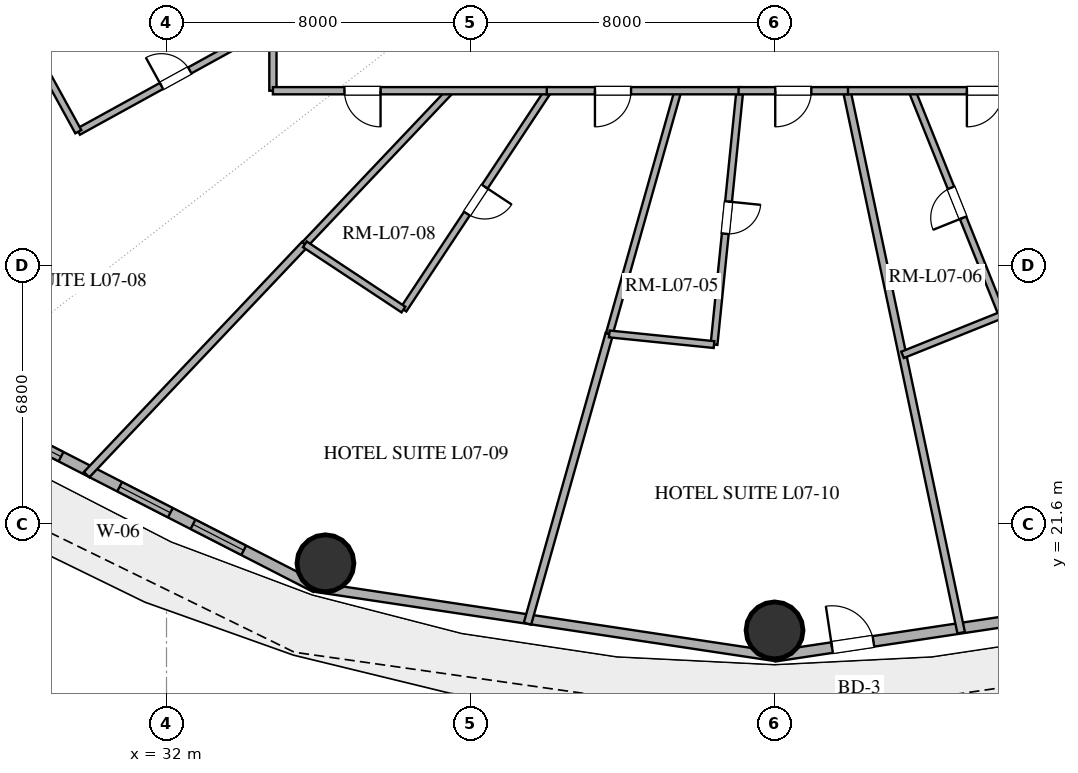
"""IFC4 building model, lengths in metres.
Left out: names, types, materials, properties, quantities, classifications, styles, units other than length and angle.
Written with IfcOpenShell. Run it as: python <this file> out.ifc"""

import sys

from ifc_helpers import new_model, si_unit, direction, frame, frame_2d, origin, origin_2d, place, context, subcontext, project, spatial, rectangle, hollow_circle, extrude, element, fill, save


model = new_model("IFC4")
c1 = context("Model", 3, precision=1e-05, world=origin(), true_north=direction((0.0, 1.0)))
c2 = subcontext(c1, "Body", "Model", "MODEL_VIEW")
j1 = project(units=[si_unit("LENGTHUNIT", "METRE"), si_unit("PLANEANGLEUNIT", "RADIAN")], contexts=[c1])
p1 = place(None, origin())
s1 = spatial("IfcSite", under=j1, at=p1, CompositionType="ELEMENT")
p2 = place(p1, origin())
s2 = spatial("IfcBuilding", under=s1, at=p2, CompositionType="ELEMENT")
p3 = place(p2, frame((0.0, 0.0, 35.4)))
s3 = spatial("IfcBuildingStorey", under=s2, at=p3, CompositionType="ELEMENT", Elevation=35.4)
for number, where, z_axis, x_axis in (
    (1, (36.182, 20.566, 0.0), (0.0, 0.0, 1.0), (1.0, 0.0, 0.0)),
    (2, (48.0, 18.8, 0.0), (0.0, 0.0, 1.0), (1.0, 0.0, 0.0)),
):
    element("IfcColumn", number, at=place(p3, frame(where, z_axis=z_axis, x_axis=x_axis)), inside=s3, PredefinedType="COLUMN", context=c2, shape_type="SweptSolid", body=[
        extrude(hollow_circle(Radius=0.75, WallThickness=0.04, at=origin_2d()), origin(), (0.0, 0.0, 1.0), 3.38),
    ])
p4 = place(p3, frame((25.826, 25.114, 0.0), z_axis=(0.0, 0.0, 1.0), x_axis=(0.889853976658, -0.456245438581, 0.0)))
e3 = element("IfcWall", 3, at=p4, inside=s3, PredefinedType="SOLIDWALL", context=c2, shape_type="SweptSolid", body=[
    extrude(rectangle(XDim=11.346, YDim=0.28, at=frame_2d((5.673, 0.0))), origin(), (0.0, 0.0, 1.0), 3.38),
])
p5 = place(p4, frame((2.17, 0.0, 0.85)))
e4 = element("IfcOpeningElement", 4, at=p5, cuts=e3, PredefinedType="OPENING", context=c2, shape_type="SweptSolid", body=[
    extrude(rectangle(XDim=1.65, YDim=2.0, at=frame_2d((0.825, 1.0))), frame((0.0, 0.15, 0.0), z_axis=(0.0, -1.0, 0.0), x_axis=(1.0, 0.0, 0.0)), (0.0, 0.0, 1.0), 0.3),
])
p6 = place(p4, frame((5.553, 0.0, 0.85)))
e5 = element("IfcOpeningElement", 5, at=p6, cuts=e3, PredefinedType="OPENING", context=c2, shape_type="SweptSolid", body=[
    extrude(rectangle(XDim=1.5, YDim=2.0, at=frame_2d((0.75, 1.0))), frame((0.0, 0.15, 0.0), z_axis=(0.0, -1.0, 0.0), x_axis=(1.0, 0.0, 0.0)), (0.0, 0.0, 1.0), 0.3),
])
p7 = place(p4, frame((7.722, 0.0, 0.85)))
e6 = element("IfcOpeningElement", 6, at=p7, cuts=e3, PredefinedType="OPENING", context=c2, shape_type="SweptSolid", body=[
    extrude(rectangle(XDim=1.5, YDim=2.0, at=frame_2d((0.75, 1.0))), frame((0.0, 0.15, 0.0), z_axis=(0.0, -1.0, 0.0), x_axis=(1.0, 0.0, 0.0)), (0.0, 0.0, 1.0), 0.3),
])
p8 = place(p3, frame((35.922, 19.938, 0.0), z_axis=(0.0, 0.0, 1.0), x_axis=(0.988864835849, -0.148816452121, 0.0)))
e7 = element("IfcWall", 7, at=p8, inside=s3, PredefinedType="SOLIDWALL", context=c2, shape_type="SweptSolid", body=[
    extrude(rectangle(XDim=12.214, YDim=0.25, at=frame_2d((6.107, 0.0))), origin(), (0.0, 0.0, 1.0), 3.38),
])
p9 = place(p3, frame((48.0, 18.12, 0.0), z_axis=(0.0, 0.0, 1.0), x_axis=(0.988864835849, 0.148816452121, 0.0)))
e8 = element("IfcWall", 8, at=p9, inside=s3, PredefinedType="SOLIDWALL", context=c2, shape_type="SweptSolid", body=[
    extrude(rectangle(XDim=12.214, YDim=0.28, at=frame_2d((6.107, 0.0))), origin(), (0.0, 0.0, 1.0), 3.38),
])
p10 = place(p9, frame((1.531, 0.0, 0.0)))
e9 = element("IfcOpeningElement", 9, at=p10, cuts=e8, PredefinedType="OPENING", context=c2, shape_type="SweptSolid", body=[
    extrude(rectangle(XDim=1.1, YDim=2.25, at=frame_2d((0.55, 1.125))), frame((0.0, 0.15, 0.0), z_axis=(0.0, -1.0, 0.0), x_axis=(1.0, 0.0, 0.0)), (0.0, 0.0, 1.0), 0.3),
])
p11 = place(p9, frame((6.116, 0.0, 0.85)))
e10 = element("IfcOpeningElement", 10, at=p11, cuts=e8, PredefinedType="OPENING", context=c2, shape_type="SweptSolid", body=[
    extrude(rectangle(XDim=1.35, YDim=1.8, at=frame_2d((0.675, 0.9))), frame((0.0, 0.15, 0.0), z_axis=(0.0, -1.0, 0.0), x_axis=(1.0, 0.0, 0.0)), (0.0, 0.0, 1.0), 0.3),
])
p12 = place(p9, frame((8.383, 0.0, 0.85)))
e11 = element("IfcOpeningElement", 11, at=p12, cuts=e8, PredefinedType="OPENING", context=c2, shape_type="SweptSolid", body=[
    extrude(rectangle(XDim=1.35, YDim=1.8, at=frame_2d((0.675, 0.9))), frame((0.0, 0.15, 0.0), z_axis=(0.0, -1.0, 0.0), x_axis=(1.0, 0.0, 0.0)), (0.0, 0.0, 1.0), 0.3),
])
p13 = place(p3, frame((34.8, 37.494, 0.0), z_axis=(0.0, 0.0, 1.0), x_axis=(-0.946390715793, -0.32302416792, 0.0)))
e12 = element("IfcWall", 12, at=p13, inside=s3, PredefinedType="PARTITIONING", context=c2, shape_type="SweptSolid", body=[
    extrude(rectangle(XDim=15.952, YDim=0.2, at=frame_2d((7.976, 0.0))), origin(), (0.0, 0.0, 1.0), 2.74),
])
p14 = place(p3, frame((29.897, 22.898, 0.0), z_axis=(0.0, 0.0, 1.0), x_axis=(0.687860615602, 0.725842802198, 0.0)))
e13 = element("IfcWall", 13, at=p14, inside=s3, PredefinedType="PARTITIONING", context=c2, shape_type="SweptSolid", body=[
    extrude(rectangle(XDim=8.35, YDim=0.2, at=frame_2d((4.175, 0.0))), origin(), (0.0, 0.0, 1.0), 2.74),
])
p15 = place(p3, frame((41.499, 18.978, 0.0), z_axis=(0.0, 0.0, 1.0), x_axis=(0.271768364569, 0.962362694632, 0.0)))
e14 = element("IfcWall", 14, at=p15, inside=s3, PredefinedType="PARTITIONING", context=c2, shape_type="SweptSolid", body=[
    extrude(rectangle(XDim=7.921, YDim=0.2, at=frame_2d((3.96, 0.0))), origin(), (0.0, 0.0, 1.0), 2.74),
])
p16 = place(p3, frame((49.9, 33.0, 0.0), z_axis=(0.0, 0.0, 1.0), x_axis=(0.206598790959, -0.97842574556, 0.0)))
e15 = element("IfcWall", 15, at=p16, inside=s3, PredefinedType="PARTITIONING", context=c2, shape_type="SweptSolid", body=[
    extrude(rectangle(XDim=14.576, YDim=0.2, at=frame_2d((7.288, 0.0))), origin(), (0.0, 0.0, 1.0), 2.74),
])
p17 = place(p3, frame((42.045, 33.0, 0.0), z_axis=(0.0, 0.0, 1.0), x_axis=(-0.551832909025, -0.833954699319, 0.0)))
e16 = element("IfcWall", 16, at=p17, inside=s3, PredefinedType="PLUMBINGWALL", context=c2, shape_type="SweptSolid", body=[
    extrude(rectangle(XDim=6.905, YDim=0.18, at=frame_2d((3.452, 0.0))), origin(), (0.0, 0.0, 1.0), 2.74),
])
p18 = place(p17, frame((3.027, 0.0, 0.0)))
e17 = element("IfcOpeningElement", 17, at=p18, cuts=e16, PredefinedType="OPENING", context=c2, shape_type="SweptSolid", body=[
    extrude(rectangle(XDim=0.85, YDim=2.1, at=frame_2d((0.425, 1.05))), frame((0.0, 0.1, 0.0), z_axis=(0.0, -1.0, 0.0), x_axis=(1.0, 0.0, 0.0)), (0.0, 0.0, 1.0), 0.2),
])
p19 = place(p3, frame((47.086, 33.0, 0.0), z_axis=(0.0, 0.0, 1.0), x_axis=(-0.101019373019, -0.994884458756, 0.0)))
e18 = element("IfcWall", 18, at=p19, inside=s3, PredefinedType="PLUMBINGWALL", context=c2, shape_type="SweptSolid", body=[
    extrude(rectangle(XDim=6.714, YDim=0.18, at=frame_2d((3.357, 0.0))), origin(), (0.0, 0.0, 1.0), 2.74),
])
p20 = place(p19, frame((2.932, 0.0, 0.0)))
e19 = element("IfcOpeningElement", 19, at=p20, cuts=e18, PredefinedType="OPENING", context=c2, shape_type="SweptSolid", body=[
    extrude(rectangle(XDim=0.85, YDim=2.1, at=frame_2d((0.425, 1.05))), frame((0.0, 0.1, 0.0), z_axis=(0.0, -1.0, 0.0), x_axis=(1.0, 0.0, 0.0)), (0.0, 0.0, 1.0), 0.2),
])
p21 = place(p3, frame((43.651, 26.601, 0.0), z_axis=(0.0, 0.0, 1.0), x_axis=(0.271761873698, 0.962364527611, 0.0)))
e20 = element("IfcWall", 20, at=p21, inside=s3, PredefinedType="PLUMBINGWALL", context=c2, shape_type="SweptSolid", body=[
    extrude(rectangle(XDim=6.65, YDim=0.18, at=frame_2d((3.325, 0.0))), origin(), (0.0, 0.0, 1.0), 2.74),
])
p22 = place(p3, frame((34.8, 33.0, 0.0), z_axis=(0.0, 0.0, 1.0), x_axis=(0.0, 1.0, 0.0)))
e21 = element("IfcWall", 21, at=p22, inside=s3, PredefinedType="PARTITIONING", context=c2, shape_type="SweptSolid", body=[
    extrude(rectangle(XDim=18.0, YDim=0.19, at=frame_2d((9.0, 0.0))), origin(), (0.0, 0.0, 1.0), 2.74),
])
p23 = place(p22, frame((7.274, 0.0, 0.0)))
e22 = element("IfcOpeningElement", 22, at=p23, cuts=e21, PredefinedType="OPENING", context=c2, shape_type="SweptSolid", body=[
    extrude(rectangle(XDim=1.0, YDim=2.2, at=frame_2d((0.5, 1.1))), frame((0.0, 0.105, 0.0), z_axis=(0.0, -1.0, 0.0), x_axis=(1.0, 0.0, 0.0)), (0.0, 0.0, 1.0), 0.21),
])
p24 = place(p22, frame((12.854, 0.0, 0.0)))
e23 = element("IfcOpeningElement", 23, at=p24, cuts=e21, PredefinedType="OPENING", context=c2, shape_type="SweptSolid", body=[
    extrude(rectangle(XDim=0.95, YDim=2.15, at=frame_2d((0.475, 1.075))), frame((0.0, 0.105, 0.0), z_axis=(0.0, -1.0, 0.0), x_axis=(1.0, 0.0, 0.0)), (0.0, 0.0, 1.0), 0.21),
])
p25 = place(p3, frame((53.987, 27.102, 0.0), z_axis=(0.0, 0.0, 1.0), x_axis=(-0.37285379951, 0.927890103509, 0.0)))
e24 = element("IfcWall", 24, at=p25, inside=s3, PredefinedType="PLUMBINGWALL", context=c2, shape_type="SweptSolid", body=[
    extrude(rectangle(XDim=6.356, YDim=0.18, at=frame_2d((3.178, 0.0))), origin(), (0.0, 0.0, 1.0), 2.74),
])
p26 = place(p25, frame((2.753, 0.0, 0.0)))
e25 = element("IfcOpeningElement", 25, at=p26, cuts=e24, PredefinedType="OPENING", context=c2, shape_type="SweptSolid", body=[
    extrude(rectangle(XDim=0.85, YDim=2.1, at=frame_2d((0.425, 1.05))), frame((0.0, 0.1, 0.0), z_axis=(0.0, -1.0, 0.0), x_axis=(1.0, 0.0, 0.0)), (0.0, 0.0, 1.0), 0.2),
])
p27 = place(p3, frame((29.679, 31.922, 0.0), z_axis=(0.0, 0.0, 1.0), x_axis=(0.876185038284, 0.481974873503, 0.0)))
e26 = element("IfcWall", 26, at=p27, inside=s3, PredefinedType="PLUMBINGWALL", context=c2, shape_type="SweptSolid", body=[
    extrude(rectangle(XDim=5.844, YDim=0.18, at=frame_2d((2.922, 0.0))), origin(), (0.0, 0.0, 1.0), 2.74),
])
p28 = place(p27, frame((2.497, 0.0, 0.0)))
e27 = element("IfcOpeningElement", 27, at=p28, cuts=e26, PredefinedType="OPENING", context=c2, shape_type="SweptSolid", body=[
    extrude(rectangle(XDim=0.85, YDim=2.1, at=frame_2d((0.425, 1.05))), frame((0.0, 0.1, 0.0), z_axis=(0.0, -1.0, 0.0), x_axis=(1.0, 0.0, 0.0)), (0.0, 0.0, 1.0), 0.2),
])
p29 = place(p3, frame((35.64, 28.958, 0.0), z_axis=(0.0, 0.0, 1.0), x_axis=(0.687867465085, 0.725836311077, 0.0)))
e28 = element("IfcWall", 28, at=p29, inside=s3, PredefinedType="PLUMBINGWALL", context=c2, shape_type="SweptSolid", body=[
    extrude(rectangle(XDim=5.568, YDim=0.18, at=frame_2d((2.784, 0.0))), origin(), (0.0, 0.0, 1.0), 2.74),
])
p30 = place(p3, frame((42.083, 33.0, 0.0), z_axis=(0.0, 0.0, 1.0), x_axis=(-1.0, 0.0, 0.0)))
e29 = element("IfcWall", 29, at=p30, inside=s3, PredefinedType="PARTITIONING", context=c2, shape_type="SweptSolid", body=[
    extrude(rectangle(XDim=7.283, YDim=0.19, at=frame_2d((3.642, 0.0))), origin(), (0.0, 0.0, 1.0), 2.74),
])
p31 = place(p30, frame((4.451, 0.0, 0.0)))
e30 = element("IfcOpeningElement", 30, at=p31, cuts=e29, PredefinedType="OPENING", context=c2, shape_type="SweptSolid", body=[
    extrude(rectangle(XDim=0.95, YDim=2.15, at=frame_2d((0.475, 1.075))), frame((0.0, 0.105, 0.0), z_axis=(0.0, -1.0, 0.0), x_axis=(1.0, 0.0, 0.0)), (0.0, 0.0, 1.0), 0.21),
])
p32 = place(p3, frame((61.2, 33.0, 0.0), z_axis=(0.0, 0.0, 1.0), x_axis=(-1.0, 0.0, 0.0)))
e31 = element("IfcWall", 31, at=p32, inside=s3, PredefinedType="PARTITIONING", context=c2, shape_type="SweptSolid", body=[
    extrude(rectangle(XDim=11.3, YDim=0.19, at=frame_2d((5.65, 0.0))), origin(), (0.0, 0.0, 1.0), 2.74),
])
p33 = place(p32, frame((7.188, 0.0, 0.0)))
e32 = element("IfcOpeningElement", 32, at=p33, cuts=e31, PredefinedType="OPENING", context=c2, shape_type="SweptSolid", body=[
    extrude(rectangle(XDim=0.95, YDim=2.15, at=frame_2d((0.475, 1.075))), frame((0.0, 0.105, 0.0), z_axis=(0.0, -1.0, 0.0), x_axis=(1.0, 0.0, 0.0)), (0.0, 0.0, 1.0), 0.21),
])
p34 = place(p3, frame((27.908, 35.142, 0.0), z_axis=(0.0, 0.0, 1.0), x_axis=(0.481967195945, -0.876189261537, 0.0)))
e33 = element("IfcWall", 33, at=p34, inside=s3, PredefinedType="PLUMBINGWALL", context=c2, shape_type="SweptSolid", body=[
    extrude(rectangle(XDim=3.676, YDim=0.18, at=frame_2d((1.838, 0.0))), origin(), (0.0, 0.0, 1.0), 2.74),
])
p35 = place(p3, frame((47.118, 33.0, 0.0), z_axis=(0.0, 0.0, 1.0), x_axis=(-1.0, 0.0, 0.0)))
e34 = element("IfcWall", 34, at=p35, inside=s3, PredefinedType="PARTITIONING", context=c2, shape_type="SweptSolid", body=[
    extrude(rectangle(XDim=5.112, YDim=0.19, at=frame_2d((2.556, 0.0))), origin(), (0.0, 0.0, 1.0), 2.74),
])
p36 = place(p35, frame((2.894, 0.0, 0.0)))
e35 = element("IfcOpeningElement", 35, at=p36, cuts=e34, PredefinedType="OPENING", context=c2, shape_type="SweptSolid", body=[
    extrude(rectangle(XDim=0.95, YDim=2.15, at=frame_2d((0.475, 1.075))), frame((0.0, 0.105, 0.0), z_axis=(0.0, -1.0, 0.0), x_axis=(1.0, 0.0, 0.0)), (0.0, 0.0, 1.0), 0.21),
])
p37 = place(p3, frame((38.235, 27.242, 0.0), z_axis=(0.0, 0.0, 1.0), x_axis=(-0.833965136837, 0.551817135055, 0.0)))
e36 = element("IfcWall", 36, at=p37, inside=s3, PredefinedType="PLUMBINGWALL", context=c2, shape_type="SweptSolid", body=[
    extrude(rectangle(XDim=3.111, YDim=0.18, at=frame_2d((1.555, 0.0))), origin(), (0.0, 0.0, 1.0), 2.74),
])
p38 = place(p3, frame((49.933, 33.0, 0.0), z_axis=(0.0, 0.0, 1.0), x_axis=(-1.0, 0.0, 0.0)))
e37 = element("IfcWall", 37, at=p38, inside=s3, PredefinedType="PARTITIONING", context=c2, shape_type="SweptSolid", body=[
    extrude(rectangle(XDim=2.879, YDim=0.19, at=frame_2d((1.44, 0.0))), origin(), (0.0, 0.0, 1.0), 2.74),
])
p39 = place(p38, frame((0.965, 0.0, 0.0)))
e38 = element("IfcOpeningElement", 38, at=p39, cuts=e37, PredefinedType="OPENING", context=c2, shape_type="SweptSolid", body=[
    extrude(rectangle(XDim=0.95, YDim=2.15, at=frame_2d((0.475, 1.075))), frame((0.0, 0.105, 0.0), z_axis=(0.0, -1.0, 0.0), x_axis=(1.0, 0.0, 0.0)), (0.0, 0.0, 1.0), 0.21),
])
p40 = place(p3, frame((51.368, 26.05, 0.0), z_axis=(0.0, 0.0, 1.0), x_axis=(0.927890861741, 0.372851912558, 0.0)))
e39 = element("IfcWall", 39, at=p40, inside=s3, PredefinedType="PLUMBINGWALL", context=c2, shape_type="SweptSolid", body=[
    extrude(rectangle(XDim=2.822, YDim=0.18, at=frame_2d((1.411, 0.0))), origin(), (0.0, 0.0, 1.0), 2.74),
])
p41 = place(p3, frame((46.407, 26.321, 0.0), z_axis=(0.0, 0.0, 1.0), x_axis=(-0.994878004338, 0.101082918857, 0.0)))
e40 = element("IfcWall", 40, at=p41, inside=s3, PredefinedType="PLUMBINGWALL", context=c2, shape_type="SweptSolid", body=[
    extrude(rectangle(XDim=2.77, YDim=0.18, at=frame_2d((1.385, 0.0))), origin(), (0.0, 0.0, 1.0), 2.74),
])
p42 = place(p5, origin())
e41 = element("IfcWindow", 41, at=p42, inside=s3, PartitioningType="SINGLE_PANEL", PredefinedType="WINDOW", context=c2, shape_type="SweptSolid", body=[
    extrude(rectangle(XDim=1.65, YDim=2.0, at=frame_2d((0.825, 1.0))), frame((0.0, 0.03, 0.0), z_axis=(0.0, -1.0, 0.0), x_axis=(1.0, 0.0, 0.0)), (0.0, 0.0, 1.0), 0.06),
])
fill(e4, e41)
p43 = place(p6, origin())
e42 = element("IfcWindow", 42, at=p43, inside=s3, PartitioningType="SINGLE_PANEL", PredefinedType="WINDOW", context=c2, shape_type="SweptSolid", body=[
    extrude(rectangle(XDim=1.5, YDim=2.0, at=frame_2d((0.75, 1.0))), frame((0.0, 0.03, 0.0), z_axis=(0.0, -1.0, 0.0), x_axis=(1.0, 0.0, 0.0)), (0.0, 0.0, 1.0), 0.06),
])
fill(e5, e42)
p44 = place(p7, origin())
e43 = element("IfcWindow", 43, at=p44, inside=s3, PartitioningType="SINGLE_PANEL", PredefinedType="WINDOW", context=c2, shape_type="SweptSolid", body=[
    extrude(rectangle(XDim=1.5, YDim=2.0, at=frame_2d((0.75, 1.0))), frame((0.0, 0.03, 0.0), z_axis=(0.0, -1.0, 0.0), x_axis=(1.0, 0.0, 0.0)), (0.0, 0.0, 1.0), 0.06),
])
fill(e6, e43)
p45 = place(p10, origin())
e44 = element("IfcDoor", 44, at=p45, inside=s3, OperationType="SINGLE_SWING_LEFT", PredefinedType="DOOR", context=c2, shape_type="SweptSolid", body=[
    extrude(rectangle(XDim=1.1, YDim=2.25, at=frame_2d((0.55, 1.125))), frame((0.0, 0.025, 0.0), z_axis=(0.0, -1.0, 0.0), x_axis=(1.0, 0.0, 0.0)), (0.0, 0.0, 1.0), 0.05),
])
fill(e9, e44)
p46 = place(p18, origin())
e45 = element("IfcDoor", 45, at=p46, inside=s3, OperationType="SINGLE_SWING_LEFT", PredefinedType="DOOR", context=c2, shape_type="SweptSolid", body=[
    extrude(rectangle(XDim=0.85, YDim=2.1, at=frame_2d((0.425, 1.05))), frame((0.0, 0.025, 0.0), z_axis=(0.0, -1.0, 0.0), x_axis=(1.0, 0.0, 0.0)), (0.0, 0.0, 1.0), 0.05),
])
fill(e17, e45)
p47 = place(p20, origin())
e46 = element("IfcDoor", 46, at=p47, inside=s3, OperationType="SINGLE_SWING_LEFT", PredefinedType="DOOR", context=c2, shape_type="SweptSolid", body=[
    extrude(rectangle(XDim=0.85, YDim=2.1, at=frame_2d((0.425, 1.05))), frame((0.0, 0.025, 0.0), z_axis=(0.0, -1.0, 0.0), x_axis=(1.0, 0.0, 0.0)), (0.0, 0.0, 1.0), 0.05),
])
fill(e19, e46)
p48 = place(p26, origin())
e47 = element("IfcDoor", 47, at=p48, inside=s3, OperationType="SINGLE_SWING_LEFT", PredefinedType="DOOR", context=c2, shape_type="SweptSolid", body=[
    extrude(rectangle(XDim=0.85, YDim=2.1, at=frame_2d((0.425, 1.05))), frame((0.0, 0.025, 0.0), z_axis=(0.0, -1.0, 0.0), x_axis=(1.0, 0.0, 0.0)), (0.0, 0.0, 1.0), 0.05),
])
fill(e25, e47)
p49 = place(p28, origin())
e48 = element("IfcDoor", 48, at=p49, inside=s3, OperationType="SINGLE_SWING_LEFT", PredefinedType="DOOR", context=c2, shape_type="SweptSolid", body=[
    extrude(rectangle(XDim=0.85, YDim=2.1, at=frame_2d((0.425, 1.05))), frame((0.0, 0.025, 0.0), z_axis=(0.0, -1.0, 0.0), x_axis=(1.0, 0.0, 0.0)), (0.0, 0.0, 1.0), 0.05),
])
fill(e27, e48)
p50 = place(p31, origin())
e49 = element("IfcDoor", 49, at=p50, inside=s3, OperationType="SINGLE_SWING_LEFT", PredefinedType="DOOR", context=c2, shape_type="SweptSolid", body=[
    extrude(rectangle(XDim=0.95, YDim=2.15, at=frame_2d((0.475, 1.075))), frame((0.0, 0.025, 0.0), z_axis=(0.0, -1.0, 0.0), x_axis=(1.0, 0.0, 0.0)), (0.0, 0.0, 1.0), 0.05),
])
fill(e30, e49)
p51 = place(p33, origin())
e50 = element("IfcDoor", 50, at=p51, inside=s3, OperationType="SINGLE_SWING_RIGHT", PredefinedType="DOOR", context=c2, shape_type="SweptSolid", body=[
    extrude(rectangle(XDim=0.95, YDim=2.15, at=frame_2d((0.475, 1.075))), frame((0.0, 0.025, 0.0), z_axis=(0.0, -1.0, 0.0), x_axis=(1.0, 0.0, 0.0)), (0.0, 0.0, 1.0), 0.05),
])
fill(e32, e50)
p52 = place(p36, origin())
e51 = element("IfcDoor", 51, at=p52, inside=s3, OperationType="SINGLE_SWING_RIGHT", PredefinedType="DOOR", context=c2, shape_type="SweptSolid", body=[
    extrude(rectangle(XDim=0.95, YDim=2.15, at=frame_2d((0.475, 1.075))), frame((0.0, 0.025, 0.0), z_axis=(0.0, -1.0, 0.0), x_axis=(1.0, 0.0, 0.0)), (0.0, 0.0, 1.0), 0.05),
])
fill(e35, e51)
p53 = place(p39, origin())
e52 = element("IfcDoor", 52, at=p53, inside=s3, OperationType="SINGLE_SWING_RIGHT", PredefinedType="DOOR", context=c2, shape_type="SweptSolid", body=[
    extrude(rectangle(XDim=0.95, YDim=2.15, at=frame_2d((0.475, 1.075))), frame((0.0, 0.025, 0.0), z_axis=(0.0, -1.0, 0.0), x_axis=(1.0, 0.0, 0.0)), (0.0, 0.0, 1.0), 0.05),
])
fill(e38, e52)
save(model, sys.argv[1])
